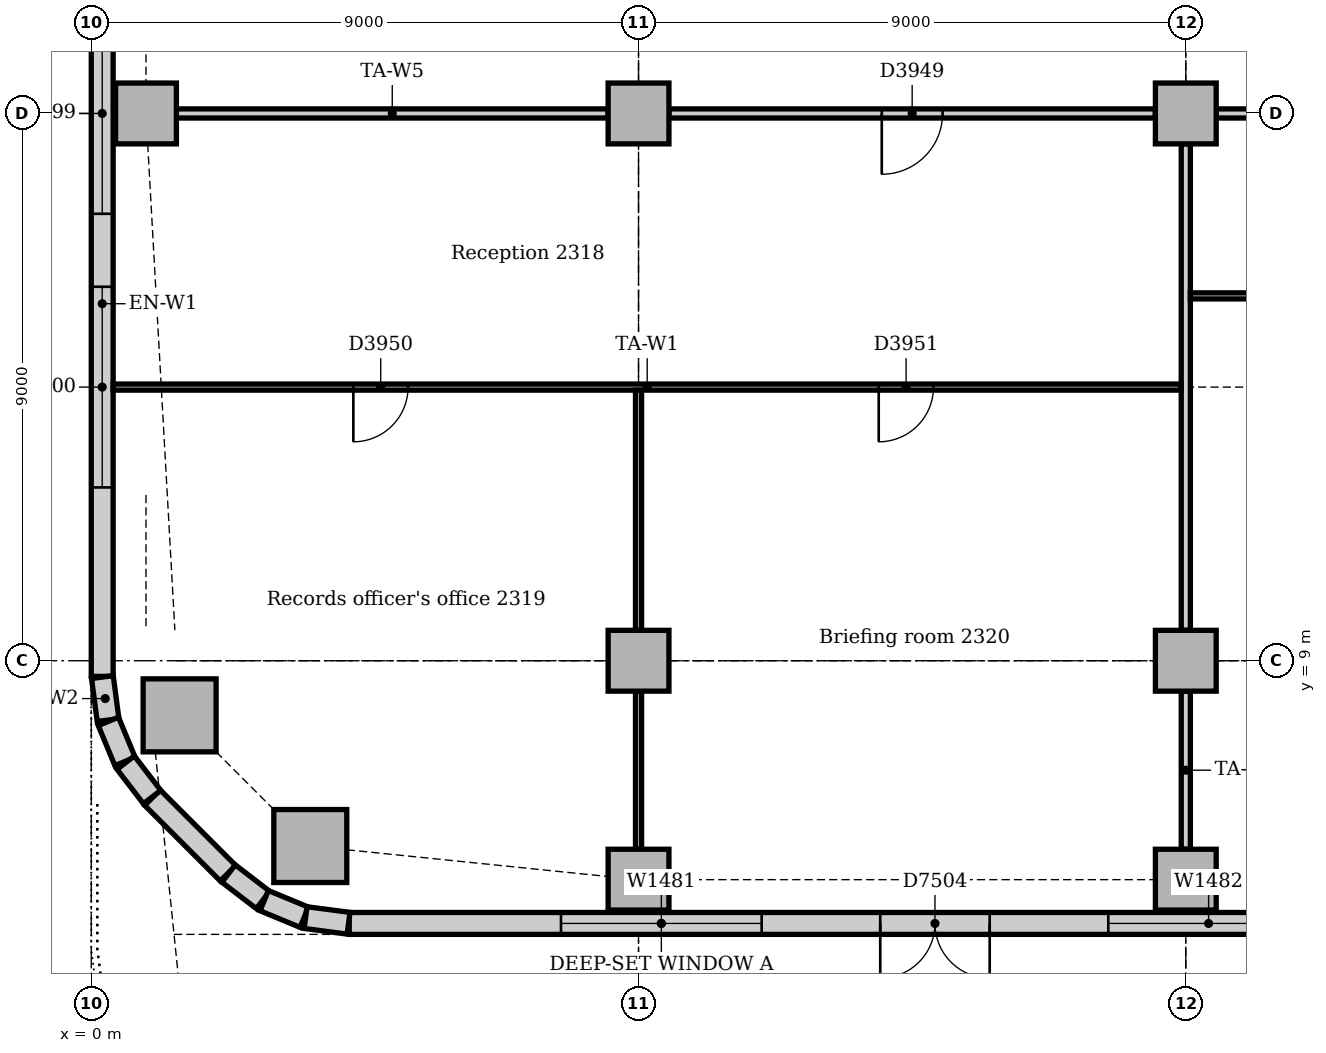
"""IFC4 building model, lengths in metres.
Left out: names, types, materials, properties, quantities, classifications, styles, units other than length and angle.
Written with IfcOpenShell. Run it as: python <this file> out.ifc"""

import sys

from ifc_helpers import new_model, si_unit, direction, frame, frame_2d, origin, origin_2d, place, context, subcontext, project, spatial, rectangle, extrude, element, fill, save


model = new_model("IFC4")
c1 = context("Model", 3, precision=1e-05, world=origin(), true_north=direction((0.0, 1.0)))
c2 = subcontext(c1, "Body", "Model", "MODEL_VIEW")
j1 = project(units=[si_unit("LENGTHUNIT", "METRE"), si_unit("PLANEANGLEUNIT", "RADIAN")], contexts=[c1])
p1 = place(None, origin())
s1 = spatial("IfcSite", under=j1, at=p1, CompositionType="ELEMENT")
p2 = place(p1, origin())
s2 = spatial("IfcBuilding", under=s1, at=p2, CompositionType="ELEMENT")
p3 = place(p2, frame((0.0, 0.0, 100.0)))
s3 = spatial("IfcBuildingStorey", under=s2, at=p3, CompositionType="ELEMENT", Elevation=100.0)
for number, where, z_axis, x_axis in (
    (1, (3.602, 5.953, -0.15), (0.0, 0.0, 1.0), (1.0, 0.0, 0.0)),
    (2, (1.453, 8.102, -0.15), (0.0, 0.0, 1.0), (1.0, 0.0, 0.0)),
):
    element("IfcColumn", number, at=place(p3, frame(where, z_axis=z_axis, x_axis=x_axis)), inside=s3, PredefinedType="COLUMN", context=c2, shape_type="SweptSolid", body=[
        extrude(rectangle(XDim=1.2, YDim=1.2, at=origin_2d()), origin(), (0.0, 0.0, 1.0), 4.0),
    ])
for number, where, z_axis, x_axis in (
    (3, (9.0, 5.4, -0.15), (0.0, 0.0, 1.0), (1.0, 0.0, 0.0)),
    (4, (18.0, 5.4, -0.15), (0.0, 0.0, 1.0), (1.0, 0.0, 0.0)),
):
    element("IfcColumn", number, at=place(p3, frame(where, z_axis=z_axis, x_axis=x_axis)), inside=s3, PredefinedType="COLUMN", context=c2, shape_type="SweptSolid", body=[
        extrude(rectangle(XDim=1.0, YDim=1.0, at=origin_2d()), origin(), (0.0, 0.0, 1.0), 4.0),
    ])
for number, where, z_axis, x_axis in (
    (5, (0.9, 18.0, 0.0), (0.0, 0.0, 1.0), (1.0, 0.0, 0.0)),
    (6, (9.0, 9.0, 0.0), (0.0, 0.0, 1.0), (1.0, 0.0, 0.0)),
    (7, (9.0, 18.0, 0.0), (0.0, 0.0, 1.0), (1.0, 0.0, 0.0)),
    (8, (18.0, 9.0, 0.0), (0.0, 0.0, 1.0), (1.0, 0.0, 0.0)),
    (9, (18.0, 18.0, 0.0), (0.0, 0.0, 1.0), (1.0, 0.0, 0.0)),
):
    element("IfcColumn", number, at=place(p3, frame(where, z_axis=z_axis, x_axis=x_axis)), inside=s3, PredefinedType="COLUMN", context=c2, shape_type="SweptSolid", body=[
        extrude(rectangle(XDim=1.0, YDim=1.0, at=origin_2d()), origin(), (0.0, 0.0, 1.0), 3.85),
    ])
p4 = place(p3, frame((4.243, 4.68, 0.0), z_axis=(0.0, 0.0, 1.0), x_axis=(1.0, 0.0, 0.0)))
e10 = element("IfcWall", 10, at=p4, inside=s3, PredefinedType="STANDARD", context=c2, shape_type="SweptSolid", body=[
    extrude(rectangle(XDim=37.265, YDim=0.36, at=frame_2d((18.632, 0.0))), origin(), (0.0, 0.0, 1.0), 3.85),
])
p5 = place(p4, frame((3.482, 0.0, 0.9)))
e11 = element("IfcOpeningElement", 11, at=p5, cuts=e10, PredefinedType="OPENING", context=c2, shape_type="SweptSolid", body=[
    extrude(rectangle(XDim=3.3, YDim=1.6, at=frame_2d((1.65, 0.8))), frame((0.0, 0.19, 0.0), z_axis=(0.0, -1.0, 0.0), x_axis=(1.0, 0.0, 0.0)), (0.0, 0.0, 1.0), 0.38),
])
p6 = place(p4, frame((8.732, 0.0, 0.0)))
e12 = element("IfcOpeningElement", 12, at=p6, cuts=e10, PredefinedType="OPENING", context=c2, shape_type="SweptSolid", body=[
    extrude(rectangle(XDim=1.8, YDim=2.4, at=frame_2d((0.9, 1.2))), frame((0.0, 0.19, 0.0), z_axis=(0.0, -1.0, 0.0), x_axis=(1.0, 0.0, 0.0)), (0.0, 0.0, 1.0), 0.38),
])
p7 = place(p4, frame((12.482, 0.0, 0.9)))
e13 = element("IfcOpeningElement", 13, at=p7, cuts=e10, PredefinedType="OPENING", context=c2, shape_type="SweptSolid", body=[
    extrude(rectangle(XDim=3.3, YDim=1.6, at=frame_2d((1.65, 0.8))), frame((0.0, 0.19, 0.0), z_axis=(0.0, -1.0, 0.0), x_axis=(1.0, 0.0, 0.0)), (0.0, 0.0, 1.0), 0.38),
])
p8 = place(p4, frame((16.982, 0.0, 0.9)))
e14 = element("IfcOpeningElement", 14, at=p8, cuts=e10, PredefinedType="OPENING", context=c2, shape_type="SweptSolid", body=[
    extrude(rectangle(XDim=3.3, YDim=1.6, at=frame_2d((1.65, 0.8))), frame((0.0, 0.19, 0.0), z_axis=(0.0, -1.0, 0.0), x_axis=(1.0, 0.0, 0.0)), (0.0, 0.0, 1.0), 0.38),
])
p9 = place(p4, frame((21.482, 0.0, 0.9)))
e15 = element("IfcOpeningElement", 15, at=p9, cuts=e10, PredefinedType="OPENING", context=c2, shape_type="SweptSolid", body=[
    extrude(rectangle(XDim=3.3, YDim=1.6, at=frame_2d((1.65, 0.8))), frame((0.0, 0.19, 0.0), z_axis=(0.0, -1.0, 0.0), x_axis=(1.0, 0.0, 0.0)), (0.0, 0.0, 1.0), 0.38),
])
p10 = place(p4, frame((27.482, 0.0, 0.9)))
e16 = element("IfcOpeningElement", 16, at=p10, cuts=e10, PredefinedType="OPENING", context=c2, shape_type="SweptSolid", body=[
    extrude(rectangle(XDim=1.8, YDim=1.6, at=frame_2d((0.9, 0.8))), frame((0.0, 0.19, 0.0), z_axis=(0.0, -1.0, 0.0), x_axis=(1.0, 0.0, 0.0)), (0.0, 0.0, 1.0), 0.38),
])
p11 = place(p4, frame((30.482, 0.0, 0.9)))
e17 = element("IfcOpeningElement", 17, at=p11, cuts=e10, PredefinedType="OPENING", context=c2, shape_type="SweptSolid", body=[
    extrude(rectangle(XDim=3.3, YDim=1.6, at=frame_2d((1.65, 0.8))), frame((0.0, 0.19, 0.0), z_axis=(0.0, -1.0, 0.0), x_axis=(1.0, 0.0, 0.0)), (0.0, 0.0, 1.0), 0.38),
])
p12 = place(p3, frame((0.18, 21.0, 0.0), z_axis=(0.0, 0.0, 1.0), x_axis=(0.0, -1.0, 0.0)))
e18 = element("IfcWall", 18, at=p12, inside=s3, PredefinedType="STANDARD", context=c2, shape_type="SweptSolid", body=[
    extrude(rectangle(XDim=12.257, YDim=0.36, at=frame_2d((6.129, 0.0))), origin(), (0.0, 0.0, 1.0), 3.85),
])
p13 = place(p12, frame((1.35, 0.0, 0.9)))
e19 = element("IfcOpeningElement", 19, at=p13, cuts=e18, PredefinedType="OPENING", context=c2, shape_type="SweptSolid", body=[
    extrude(rectangle(XDim=3.3, YDim=1.6, at=frame_2d((1.65, 0.8))), frame((0.0, 0.19, 0.0), z_axis=(0.0, -1.0, 0.0), x_axis=(1.0, 0.0, 0.0)), (0.0, 0.0, 1.0), 0.38),
])
p14 = place(p12, frame((5.85, 0.0, 0.9)))
e20 = element("IfcOpeningElement", 20, at=p14, cuts=e18, PredefinedType="OPENING", context=c2, shape_type="SweptSolid", body=[
    extrude(rectangle(XDim=3.3, YDim=1.6, at=frame_2d((1.65, 0.8))), frame((0.0, 0.19, 0.0), z_axis=(0.0, -1.0, 0.0), x_axis=(1.0, 0.0, 0.0)), (0.0, 0.0, 1.0), 0.38),
])
p15 = place(p3, frame((1.006, 6.749, 0.0), z_axis=(0.0, 0.0, 1.0), x_axis=(0.707106781187, -0.707106781187, 0.0)))
e21 = element("IfcWall", 21, at=p15, inside=s3, PredefinedType="STANDARD", context=c2, shape_type="SweptSolid", body=[
    extrude(rectangle(XDim=1.757, YDim=0.36, at=frame_2d((0.879, 0.0))), origin(), (0.0, 0.0, 1.0), 3.85),
])
for number, where, z_axis, x_axis in (
    (22, (0.183, 8.731, 0.0), (0.0, 0.0, 1.0), (0.131, -0.991, 0.0)),
    (23, (0.282, 8.003, 0.0), (0.0, 0.0, 1.0), (0.383, -0.924, 0.0)),
):
    element("IfcWall", number, at=place(p3, frame(where, z_axis=z_axis, x_axis=x_axis)), inside=s3, PredefinedType="STANDARD", context=c2, shape_type="SweptSolid", body=[
        extrude(rectangle(XDim=0.713, YDim=0.36, at=frame_2d((0.356, 0.0))), origin(), (0.0, 0.0, 1.0), 3.85),
    ])
for number, where, z_axis, x_axis in (
    (24, (0.566, 7.324, 0.0), (0.0, 0.0, 1.0), (0.609, -0.793, 0.0)),
    (25, (2.259, 5.5, 0.0), (0.0, 0.0, 1.0), (0.793, -0.609, 0.0)),
):
    element("IfcWall", number, at=place(p3, frame(where, z_axis=z_axis, x_axis=x_axis)), inside=s3, PredefinedType="STANDARD", context=c2, shape_type="SweptSolid", body=[
        extrude(rectangle(XDim=0.713, YDim=0.36, at=frame_2d((0.357, 0.0))), origin(), (0.0, 0.0, 1.0), 3.85),
    ])
for number, where, z_axis, x_axis in (
    (26, (2.844, 5.055, 0.0), (0.0, 0.0, 1.0), (0.924, -0.383, 0.0)),
    (27, (3.524, 4.776, 0.0), (0.0, 0.0, 1.0), (0.991, -0.131, 0.0)),
):
    element("IfcWall", number, at=place(p3, frame(where, z_axis=z_axis, x_axis=x_axis)), inside=s3, PredefinedType="STANDARD", context=c2, shape_type="SweptSolid", body=[
        extrude(rectangle(XDim=0.713, YDim=0.36, at=frame_2d((0.356, 0.0))), origin(), (0.0, 0.0, 1.0), 3.85),
    ])
p16 = place(p3, frame((18.5, 18.0, 0.0), z_axis=(0.0, 0.0, 1.0), x_axis=(1.0, 0.0, 0.0)))
e28 = element("IfcWall", 28, at=p16, inside=s3, PredefinedType="PARTITIONING", context=c2, shape_type="SweptSolid", body=[
    extrude(rectangle(XDim=8.0, YDim=0.15, at=frame_2d((4.0, 0.0))), origin(), (0.0, 0.0, 1.0), 3.158),
])
p17 = place(p16, frame((3.5, 0.0, 0.0)))
e29 = element("IfcOpeningElement", 29, at=p17, cuts=e28, PredefinedType="OPENING", context=c2, shape_type="SweptSolid", body=[
    extrude(rectangle(XDim=1.0, YDim=2.1, at=frame_2d((0.5, 1.05))), frame((0.0, 0.085, 0.0), z_axis=(0.0, -1.0, 0.0), x_axis=(1.0, 0.0, 0.0)), (0.0, 0.0, 1.0), 0.17),
])
p18 = place(p3, frame((9.5, 18.0, 0.0), z_axis=(0.0, 0.0, 1.0), x_axis=(1.0, 0.0, 0.0)))
e30 = element("IfcWall", 30, at=p18, inside=s3, PredefinedType="PARTITIONING", context=c2, shape_type="SweptSolid", body=[
    extrude(rectangle(XDim=8.0, YDim=0.15, at=frame_2d((4.0, 0.0))), origin(), (0.0, 0.0, 1.0), 3.158),
])
p19 = place(p18, frame((3.5, 0.0, 0.0)))
e31 = element("IfcOpeningElement", 31, at=p19, cuts=e30, PredefinedType="OPENING", context=c2, shape_type="SweptSolid", body=[
    extrude(rectangle(XDim=1.0, YDim=2.1, at=frame_2d((0.5, 1.05))), frame((0.0, 0.085, 0.0), z_axis=(0.0, -1.0, 0.0), x_axis=(1.0, 0.0, 0.0)), (0.0, 0.0, 1.0), 0.17),
])
p20 = place(p3, frame((1.4, 18.0, 0.0), z_axis=(0.0, 0.0, 1.0), x_axis=(1.0, 0.0, 0.0)))
e32 = element("IfcWall", 32, at=p20, inside=s3, PredefinedType="PARTITIONING", context=c2, shape_type="SweptSolid", body=[
    extrude(rectangle(XDim=7.1, YDim=0.15, at=frame_2d((3.55, 0.0))), origin(), (0.0, 0.0, 1.0), 3.158),
])
p21 = place(p3, frame((18.0, 5.9, 0.0), z_axis=(0.0, 0.0, 1.0), x_axis=(0.0, 1.0, 0.0)))
e33 = element("IfcWall", 33, at=p21, inside=s3, PredefinedType="PARTITIONING", context=c2, shape_type="SweptSolid", body=[
    extrude(rectangle(XDim=2.6, YDim=0.15, at=frame_2d((1.3, 0.0))), origin(), (0.0, 0.0, 1.0), 3.652),
])
p22 = place(p3, frame((18.0, 9.5, 0.0), z_axis=(0.0, 0.0, 1.0), x_axis=(0.0, 1.0, 0.0)))
e34 = element("IfcWall", 34, at=p22, inside=s3, PredefinedType="PARTITIONING", context=c2, shape_type="SweptSolid", body=[
    extrude(rectangle(XDim=8.0, YDim=0.15, at=frame_2d((4.0, 0.0))), origin(), (0.0, 0.0, 1.0), 3.256),
])
p23 = place(p3, frame((0.36, 13.5, 0.0), z_axis=(0.0, 0.0, 1.0), x_axis=(1.0, 0.0, 0.0)))
e35 = element("IfcWall", 35, at=p23, inside=s3, PredefinedType="PARTITIONING", context=c2, shape_type="SweptSolid", body=[
    extrude(rectangle(XDim=17.565, YDim=0.1, at=frame_2d((8.783, 0.0))), origin(), (0.0, 0.0, 1.0), 3.354),
])
p24 = place(p23, frame((3.95, 0.0, 0.0)))
e36 = element("IfcOpeningElement", 36, at=p24, cuts=e35, PredefinedType="OPENING", context=c2, shape_type="SweptSolid", body=[
    extrude(rectangle(XDim=0.9, YDim=2.1, at=frame_2d((0.45, 1.05))), frame((0.0, 0.06, 0.0), z_axis=(0.0, -1.0, 0.0), x_axis=(1.0, 0.0, 0.0)), (0.0, 0.0, 1.0), 0.12),
])
p25 = place(p23, frame((12.59, 0.0, 0.0)))
e37 = element("IfcOpeningElement", 37, at=p25, cuts=e35, PredefinedType="OPENING", context=c2, shape_type="SweptSolid", body=[
    extrude(rectangle(XDim=0.9, YDim=2.1, at=frame_2d((0.45, 1.05))), frame((0.0, 0.06, 0.0), z_axis=(0.0, -1.0, 0.0), x_axis=(1.0, 0.0, 0.0)), (0.0, 0.0, 1.0), 0.12),
])
p26 = place(p3, frame((18.075, 15.0, 0.0), z_axis=(0.0, 0.0, 1.0), x_axis=(1.0, 0.0, 0.0)))
e38 = element("IfcWall", 38, at=p26, inside=s3, PredefinedType="PARTITIONING", context=c2, shape_type="SweptSolid", body=[
    extrude(rectangle(XDim=13.35, YDim=0.1, at=frame_2d((6.675, 0.0))), origin(), (0.0, 0.0, 1.0), 3.85),
])
p27 = place(p26, frame((6.2, 0.0, 0.0)))
e39 = element("IfcOpeningElement", 39, at=p27, cuts=e38, PredefinedType="OPENING", context=c2, shape_type="SweptSolid", body=[
    extrude(rectangle(XDim=0.9, YDim=2.1, at=frame_2d((0.45, 1.05))), frame((0.0, 0.06, 0.0), z_axis=(0.0, -1.0, 0.0), x_axis=(1.0, 0.0, 0.0)), (0.0, 0.0, 1.0), 0.12),
])
p28 = place(p3, frame((9.0, 5.9, 0.0), z_axis=(0.0, 0.0, 1.0), x_axis=(0.0, 1.0, 0.0)))
e40 = element("IfcWall", 40, at=p28, inside=s3, PredefinedType="PARTITIONING", context=c2, shape_type="SweptSolid", body=[
    extrude(rectangle(XDim=2.6, YDim=0.1, at=frame_2d((1.3, 0.0))), origin(), (0.0, 0.0, 1.0), 3.652),
])
p29 = place(p3, frame((9.0, 9.5, 0.0), z_axis=(0.0, 0.0, 1.0), x_axis=(0.0, 1.0, 0.0)))
e41 = element("IfcWall", 41, at=p29, inside=s3, PredefinedType="PARTITIONING", context=c2, shape_type="SweptSolid", body=[
    extrude(rectangle(XDim=3.95, YDim=0.1, at=frame_2d((1.975, 0.0))), origin(), (0.0, 0.0, 1.0), 3.256),
])
p30 = place(p5, origin())
e42 = element("IfcWindow", 42, at=p30, inside=s3, PartitioningType="SINGLE_PANEL", PredefinedType="WINDOW", context=c2, shape_type="SweptSolid", body=[
    extrude(rectangle(XDim=3.3, YDim=1.6, at=frame_2d((1.65, 0.8))), frame((0.0, 0.13, 0.0), z_axis=(0.0, -1.0, 0.0), x_axis=(1.0, 0.0, 0.0)), (0.0, 0.0, 1.0), 0.06),
])
fill(e11, e42)
p31 = place(p6, frame((1.8, 0.0, 0.0), z_axis=(0.0, 0.0, 1.0), x_axis=(-1.0, 0.0, 0.0)))
e43 = element("IfcDoor", 43, at=p31, inside=s3, OperationType="DOUBLE_DOOR_SINGLE_SWING", PredefinedType="DOOR", context=c2, shape_type="SweptSolid", body=[
    extrude(rectangle(XDim=1.8, YDim=2.4, at=frame_2d((0.9, 1.2))), frame((0.0, -0.07, 0.0), z_axis=(0.0, -1.0, 0.0), x_axis=(1.0, 0.0, 0.0)), (0.0, 0.0, 1.0), 0.05),
])
fill(e12, e43)
p32 = place(p7, origin())
e44 = element("IfcWindow", 44, at=p32, inside=s3, PartitioningType="SINGLE_PANEL", PredefinedType="WINDOW", context=c2, shape_type="SweptSolid", body=[
    extrude(rectangle(XDim=3.3, YDim=1.6, at=frame_2d((1.65, 0.8))), frame((0.0, 0.13, 0.0), z_axis=(0.0, -1.0, 0.0), x_axis=(1.0, 0.0, 0.0)), (0.0, 0.0, 1.0), 0.06),
])
fill(e13, e44)
p33 = place(p13, origin())
e45 = element("IfcWindow", 45, at=p33, inside=s3, PartitioningType="SINGLE_PANEL", PredefinedType="WINDOW", context=c2, shape_type="SweptSolid", body=[
    extrude(rectangle(XDim=3.3, YDim=1.6, at=frame_2d((1.65, 0.8))), frame((0.0, 0.13, 0.0), z_axis=(0.0, -1.0, 0.0), x_axis=(1.0, 0.0, 0.0)), (0.0, 0.0, 1.0), 0.06),
])
fill(e19, e45)
p34 = place(p14, origin())
e46 = element("IfcWindow", 46, at=p34, inside=s3, PartitioningType="SINGLE_PANEL", PredefinedType="WINDOW", context=c2, shape_type="SweptSolid", body=[
    extrude(rectangle(XDim=3.3, YDim=1.6, at=frame_2d((1.65, 0.8))), frame((0.0, 0.13, 0.0), z_axis=(0.0, -1.0, 0.0), x_axis=(1.0, 0.0, 0.0)), (0.0, 0.0, 1.0), 0.06),
])
fill(e20, e46)
p35 = place(p19, frame((1.0, 0.0, 0.0), z_axis=(0.0, 0.0, 1.0), x_axis=(-1.0, 0.0, 0.0)))
e47 = element("IfcDoor", 47, at=p35, inside=s3, OperationType="SINGLE_SWING_RIGHT", PredefinedType="DOOR", context=c2, shape_type="SweptSolid", body=[
    extrude(rectangle(XDim=1.0, YDim=2.1, at=frame_2d((0.5, 1.05))), frame((0.0, 0.025, 0.0), z_axis=(0.0, -1.0, 0.0), x_axis=(1.0, 0.0, 0.0)), (0.0, 0.0, 1.0), 0.05),
])
fill(e31, e47)
p36 = place(p24, frame((0.9, 0.0, 0.0), z_axis=(0.0, 0.0, 1.0), x_axis=(-1.0, 0.0, 0.0)))
e48 = element("IfcDoor", 48, at=p36, inside=s3, OperationType="SINGLE_SWING_RIGHT", PredefinedType="DOOR", context=c2, shape_type="SweptSolid", body=[
    extrude(rectangle(XDim=0.9, YDim=2.1, at=frame_2d((0.45, 1.05))), frame((0.0, 0.025, 0.0), z_axis=(0.0, -1.0, 0.0), x_axis=(1.0, 0.0, 0.0)), (0.0, 0.0, 1.0), 0.05),
])
fill(e36, e48)
p37 = place(p25, frame((0.9, 0.0, 0.0), z_axis=(0.0, 0.0, 1.0), x_axis=(-1.0, 0.0, 0.0)))
e49 = element("IfcDoor", 49, at=p37, inside=s3, OperationType="SINGLE_SWING_RIGHT", PredefinedType="DOOR", context=c2, shape_type="SweptSolid", body=[
    extrude(rectangle(XDim=0.9, YDim=2.1, at=frame_2d((0.45, 1.05))), frame((0.0, 0.025, 0.0), z_axis=(0.0, -1.0, 0.0), x_axis=(1.0, 0.0, 0.0)), (0.0, 0.0, 1.0), 0.05),
])
fill(e37, e49)
save(model, sys.argv[1])
